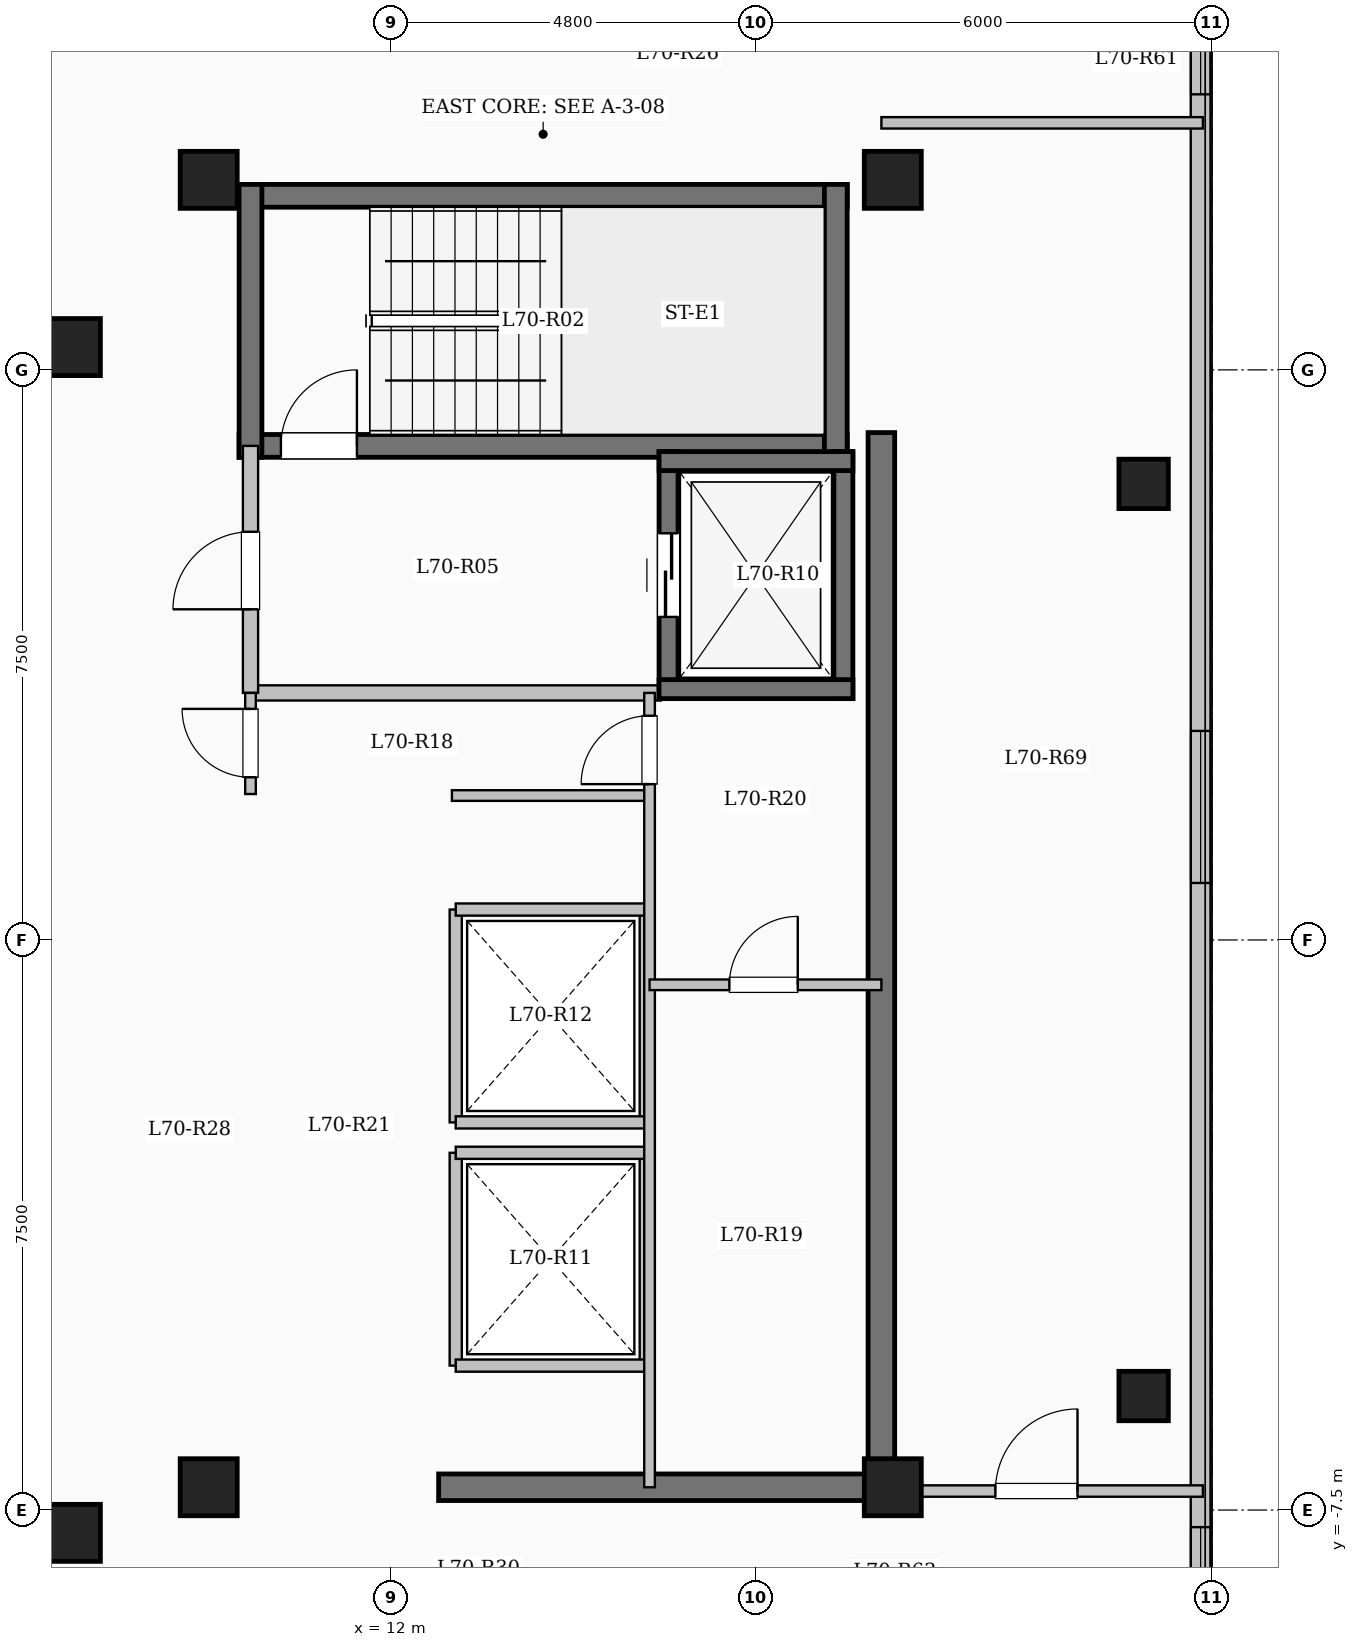
"""IFC4 building model, lengths in metres.
Left out: names, types, materials, properties, quantities, classifications, styles, units other than length and angle.
Written with IfcOpenShell. Run it as: python <this file> out.ifc"""

import sys

from ifc_helpers import new_model, si_unit, direction, frame, frame_2d, origin, origin_2d, place, context, subcontext, project, spatial, rectangle, extrude, element, fill, save


model = new_model("IFC4")
c1 = context("Model", 3, precision=1e-05, world=origin(), true_north=direction((0.0, 1.0)))
c2 = subcontext(c1, "Body", "Model", "MODEL_VIEW")
j1 = project(units=[si_unit("LENGTHUNIT", "METRE"), si_unit("PLANEANGLEUNIT", "RADIAN")], contexts=[c1])
p1 = place(None, origin())
s1 = spatial("IfcSite", under=j1, at=p1, CompositionType="ELEMENT")
p2 = place(p1, origin())
s2 = spatial("IfcBuilding", under=s1, at=p2, CompositionType="ELEMENT")
p3 = place(p2, frame((0.0, 0.0, 258.25)))
s3 = spatial("IfcBuildingStorey", under=s2, at=p3, CompositionType="ELEMENT", Elevation=258.25)
for number, where, z_axis, x_axis in (
    (1, (7.8, -7.8, 0.0), (0.0, 0.0, 1.0), (1.0, 0.0, 0.0)),
    (2, (7.8, 7.8, 0.0), (0.0, 0.0, 1.0), (1.0, 0.0, 0.0)),
    (3, (9.6, -7.2, 0.0), (0.0, 0.0, 1.0), (1.0, 0.0, 0.0)),
    (4, (9.6, 10.0, 0.0), (0.0, 0.0, 1.0), (1.0, 0.0, 0.0)),
    (5, (18.6, -7.2, 0.0), (0.0, 0.0, 1.0), (1.0, 0.0, 0.0)),
    (6, (18.6, 10.0, 0.0), (0.0, 0.0, 1.0), (1.0, 0.0, 0.0)),
):
    element("IfcColumn", number, at=place(p3, frame(where, z_axis=z_axis, x_axis=x_axis)), inside=s3, PredefinedType="COLUMN", context=c2, shape_type="SweptSolid", body=[
        extrude(rectangle(XDim=0.75, YDim=0.75, at=origin_2d()), origin(), (0.0, 0.0, 1.0), 3.35),
    ])
for number, where, z_axis, x_axis in (
    (7, (21.9, -6.0, 0.0), (0.0, 0.0, 1.0), (1.0, 0.0, 0.0)),
    (8, (21.9, 6.0, 0.0), (0.0, 0.0, 1.0), (1.0, 0.0, 0.0)),
):
    element("IfcColumn", number, at=place(p3, frame(where, z_axis=z_axis, x_axis=x_axis)), inside=s3, PredefinedType="COLUMN", context=c2, shape_type="SweptSolid", body=[
        extrude(rectangle(XDim=0.65, YDim=0.65, at=origin_2d()), origin(), (0.0, 0.0, 1.0), 3.35),
    ])
p4 = place(p3, frame((22.65, 17.55, 0.0), z_axis=(0.0, 0.0, 1.0), x_axis=(0.0, -1.0, 0.0)))
e9 = element("IfcWall", 9, at=p4, inside=s3, PredefinedType="SOLIDWALL", context=c2, shape_type="SweptSolid", body=[
    extrude(rectangle(XDim=35.1, YDim=0.26, at=frame_2d((17.55, 0.0))), origin(), (0.0, 0.0, 1.0), 3.1),
])
p5 = place(p4, frame((1.525, 0.0, 0.9)))
e10 = element("IfcOpeningElement", 10, at=p5, cuts=e9, PredefinedType="OPENING", context=c2, shape_type="SweptSolid", body=[
    extrude(rectangle(XDim=2.0, YDim=1.7, at=frame_2d((1.0, 0.85))), frame((0.0, 0.14, 0.0), z_axis=(0.0, -1.0, 0.0), x_axis=(1.0, 0.0, 0.0)), (0.0, 0.0, 1.0), 0.28),
])
p6 = place(p4, frame((5.425, 0.0, 0.95)))
e11 = element("IfcOpeningElement", 11, at=p6, cuts=e9, PredefinedType="OPENING", context=c2, shape_type="SweptSolid", body=[
    extrude(rectangle(XDim=1.0, YDim=1.5, at=frame_2d((0.5, 0.75))), frame((0.0, 0.14, 0.0), z_axis=(0.0, -1.0, 0.0), x_axis=(1.0, 0.0, 0.0)), (0.0, 0.0, 1.0), 0.28),
])
p7 = place(p4, frame((14.8, 0.0, 0.9)))
e12 = element("IfcOpeningElement", 12, at=p7, cuts=e9, PredefinedType="OPENING", context=c2, shape_type="SweptSolid", body=[
    extrude(rectangle(XDim=2.0, YDim=1.7, at=frame_2d((1.0, 0.85))), frame((0.0, 0.14, 0.0), z_axis=(0.0, -1.0, 0.0), x_axis=(1.0, 0.0, 0.0)), (0.0, 0.0, 1.0), 0.28),
])
p8 = place(p4, frame((25.275, 0.0, 0.95)))
e13 = element("IfcOpeningElement", 13, at=p8, cuts=e9, PredefinedType="OPENING", context=c2, shape_type="SweptSolid", body=[
    extrude(rectangle(XDim=1.2, YDim=1.5, at=frame_2d((0.6, 0.75))), frame((0.0, 0.14, 0.0), z_axis=(0.0, -1.0, 0.0), x_axis=(1.0, 0.0, 0.0)), (0.0, 0.0, 1.0), 0.28),
])
p9 = place(p4, frame((29.925, 0.0, 0.9)))
e14 = element("IfcOpeningElement", 14, at=p9, cuts=e9, PredefinedType="OPENING", context=c2, shape_type="SweptSolid", body=[
    extrude(rectangle(XDim=2.2, YDim=1.75, at=frame_2d((1.1, 0.875))), frame((0.0, 0.14, 0.0), z_axis=(0.0, -1.0, 0.0), x_axis=(1.0, 0.0, 0.0)), (0.0, 0.0, 1.0), 0.28),
])
p10 = place(p3, frame((10.0, 9.79, 0.0), z_axis=(0.0, 0.0, 1.0), x_axis=(1.0, 0.0, 0.0)))
e15 = element("IfcWall", 15, at=p10, inside=s3, PredefinedType="SHEAR", context=c2, shape_type="SweptSolid", body=[
    extrude(rectangle(XDim=8.0, YDim=0.3, at=frame_2d((4.0, 0.0))), origin(), (0.0, 0.0, 1.0), 3.35),
])
p11 = place(p3, frame((10.0, 6.5, 0.0), z_axis=(0.0, 0.0, 1.0), x_axis=(1.0, 0.0, 0.0)))
e16 = element("IfcWall", 16, at=p11, inside=s3, PredefinedType="SHEAR", context=c2, shape_type="SweptSolid", body=[
    extrude(rectangle(XDim=8.0, YDim=0.3, at=frame_2d((4.0, 0.0))), origin(), (0.0, 0.0, 1.0), 3.35),
])
p12 = place(p11, frame((0.55, 0.0, 0.0)))
e17 = element("IfcOpeningElement", 17, at=p12, cuts=e16, PredefinedType="OPENING", context=c2, shape_type="SweptSolid", body=[
    extrude(rectangle(XDim=1.0, YDim=2.15, at=frame_2d((0.5, 1.075))), frame((0.0, 0.16, 0.0), z_axis=(0.0, -1.0, 0.0), x_axis=(1.0, 0.0, 0.0)), (0.0, 0.0, 1.0), 0.32),
])
for number, where, z_axis, x_axis in (
    (18, (10.15, 6.35, 0.0), (0.0, 0.0, 1.0), (0.0, 1.0, 0.0)),
    (19, (17.85, 6.35, 0.0), (0.0, 0.0, 1.0), (0.0, 1.0, 0.0)),
):
    element("IfcWall", number, at=place(p3, frame(where, z_axis=z_axis, x_axis=x_axis)), inside=s3, PredefinedType="SHEAR", context=c2, shape_type="SweptSolid", body=[
        extrude(rectangle(XDim=3.59, YDim=0.3, at=frame_2d((1.795, 0.0))), origin(), (0.0, 0.0, 1.0), 3.35),
    ])
p13 = place(p3, frame((10.15, 3.25, 0.0), z_axis=(0.0, 0.0, 1.0), x_axis=(1.0, 0.0, 0.0)))
e20 = element("IfcWall", 20, at=p13, inside=s3, PredefinedType="SOLIDWALL", context=c2, shape_type="SweptSolid", body=[
    extrude(rectangle(XDim=5.4, YDim=0.2, at=frame_2d((2.7, 0.0))), origin(), (0.0, 0.0, 1.0), 3.1),
])
p14 = place(p3, frame((10.15, 3.25, 0.0), z_axis=(0.0, 0.0, 1.0), x_axis=(0.0, 1.0, 0.0)))
e21 = element("IfcWall", 21, at=p14, inside=s3, PredefinedType="SOLIDWALL", context=c2, shape_type="SweptSolid", body=[
    extrude(rectangle(XDim=3.25, YDim=0.2, at=frame_2d((1.625, 0.0))), origin(), (0.0, 0.0, 1.0), 3.1),
])
p15 = place(p14, frame((1.1, 0.0, 0.0)))
e22 = element("IfcOpeningElement", 22, at=p15, cuts=e21, PredefinedType="OPENING", context=c2, shape_type="SweptSolid", body=[
    extrude(rectangle(XDim=1.02, YDim=2.15, at=frame_2d((0.51, 1.075))), frame((0.0, 0.11, 0.0), z_axis=(0.0, -1.0, 0.0), x_axis=(1.0, 0.0, 0.0)), (0.0, 0.0, 1.0), 0.22),
])
p16 = place(p3, frame((15.65, 3.175, 0.0), z_axis=(0.0, 0.0, 1.0), x_axis=(0.0, 1.0, 0.0)))
e23 = element("IfcWall", 23, at=p16, inside=s3, PredefinedType="SHEAR", context=c2, shape_type="SweptSolid", body=[
    extrude(rectangle(XDim=3.25, YDim=0.25, at=frame_2d((1.625, 0.0))), origin(), (0.0, 0.0, 1.0), 3.35),
])
p17 = place(p16, frame((1.075, 0.0, 0.0)))
e24 = element("IfcOpeningElement", 24, at=p17, cuts=e23, PredefinedType="OPENING", context=c2, shape_type="SweptSolid", body=[
    extrude(rectangle(XDim=1.1, YDim=2.15, at=frame_2d((0.55, 1.075))), frame((0.0, 0.135, 0.0), z_axis=(0.0, -1.0, 0.0), x_axis=(1.0, 0.0, 0.0)), (0.0, 0.0, 1.0), 0.27),
])
p18 = place(p3, frame((17.95, 3.175, 0.0), z_axis=(0.0, 0.0, 1.0), x_axis=(0.0, 1.0, 0.0)))
e25 = element("IfcWall", 25, at=p18, inside=s3, PredefinedType="SHEAR", context=c2, shape_type="SweptSolid", body=[
    extrude(rectangle(XDim=3.25, YDim=0.25, at=frame_2d((1.625, 0.0))), origin(), (0.0, 0.0, 1.0), 3.35),
])
for number, where, z_axis, x_axis in (
    (26, (15.525, 3.3, 0.0), (0.0, 0.0, 1.0), (1.0, 0.0, 0.0)),
    (27, (15.525, 6.3, 0.0), (0.0, 0.0, 1.0), (1.0, 0.0, 0.0)),
):
    element("IfcWall", number, at=place(p3, frame(where, z_axis=z_axis, x_axis=x_axis)), inside=s3, PredefinedType="SHEAR", context=c2, shape_type="SweptSolid", body=[
        extrude(rectangle(XDim=2.55, YDim=0.25, at=frame_2d((1.275, 0.0))), origin(), (0.0, 0.0, 1.0), 3.35),
    ])
for number, where, z_axis, x_axis in (
    (28, (12.85, -5.6, 0.0), (0.0, 0.0, 1.0), (0.0, 1.0, 0.0)),
    (29, (15.35, -5.6, 0.0), (0.0, 0.0, 1.0), (0.0, 1.0, 0.0)),
):
    element("IfcWall", number, at=place(p3, frame(where, z_axis=z_axis, x_axis=x_axis)), inside=s3, PredefinedType="SOLIDWALL", context=c2, shape_type="SweptSolid", body=[
        extrude(rectangle(XDim=2.8, YDim=0.16, at=frame_2d((1.4, 0.0))), origin(), (0.0, 0.0, 1.0), 3.1),
    ])
for number, where, z_axis, x_axis in (
    (30, (12.85, -5.6, 0.0), (0.0, 0.0, 1.0), (1.0, 0.0, 0.0)),
    (31, (12.85, -2.8, 0.0), (0.0, 0.0, 1.0), (1.0, 0.0, 0.0)),
):
    element("IfcWall", number, at=place(p3, frame(where, z_axis=z_axis, x_axis=x_axis)), inside=s3, PredefinedType="SOLIDWALL", context=c2, shape_type="SweptSolid", body=[
        extrude(rectangle(XDim=2.5, YDim=0.16, at=frame_2d((1.25, 0.0))), origin(), (0.0, 0.0, 1.0), 3.1),
    ])
for number, where, z_axis, x_axis in (
    (32, (12.85, -2.4, 0.0), (0.0, 0.0, 1.0), (0.0, 1.0, 0.0)),
    (33, (15.35, -2.4, 0.0), (0.0, 0.0, 1.0), (0.0, 1.0, 0.0)),
):
    element("IfcWall", number, at=place(p3, frame(where, z_axis=z_axis, x_axis=x_axis)), inside=s3, PredefinedType="SOLIDWALL", context=c2, shape_type="SweptSolid", body=[
        extrude(rectangle(XDim=2.8, YDim=0.16, at=frame_2d((1.4, 0.0))), origin(), (0.0, 0.0, 1.0), 3.1),
    ])
for number, where, z_axis, x_axis in (
    (34, (12.85, -2.4, 0.0), (0.0, 0.0, 1.0), (1.0, 0.0, 0.0)),
    (35, (12.85, 0.4, 0.0), (0.0, 0.0, 1.0), (1.0, 0.0, 0.0)),
):
    element("IfcWall", number, at=place(p3, frame(where, z_axis=z_axis, x_axis=x_axis)), inside=s3, PredefinedType="SOLIDWALL", context=c2, shape_type="SweptSolid", body=[
        extrude(rectangle(XDim=2.5, YDim=0.16, at=frame_2d((1.25, 0.0))), origin(), (0.0, 0.0, 1.0), 3.1),
    ])
p19 = place(p3, frame((18.45, -7.375, 0.0), z_axis=(0.0, 0.0, 1.0), x_axis=(0.0, 1.0, 0.0)))
e36 = element("IfcWall", 36, at=p19, inside=s3, PredefinedType="SHEAR", context=c2, shape_type="SweptSolid", body=[
    extrude(rectangle(XDim=14.05, YDim=0.35, at=frame_2d((7.025, 0.0))), origin(), (0.0, 0.0, 1.0), 3.35),
])
p20 = place(p3, frame((12.625, -7.2, 0.0), z_axis=(0.0, 0.0, 1.0), x_axis=(1.0, 0.0, 0.0)))
e37 = element("IfcWall", 37, at=p20, inside=s3, PredefinedType="SHEAR", context=c2, shape_type="SweptSolid", body=[
    extrude(rectangle(XDim=6.0, YDim=0.35, at=frame_2d((3.0, 0.0))), origin(), (0.0, 0.0, 1.0), 3.35),
])
p21 = place(p3, frame((12.8, 1.9, 0.0), z_axis=(0.0, 0.0, 1.0), x_axis=(1.0, 0.0, 0.0)))
e38 = element("IfcWall", 38, at=p21, inside=s3, PredefinedType="PARTITIONING", context=c2, shape_type="SweptSolid", body=[
    extrude(rectangle(XDim=2.6, YDim=0.14, at=frame_2d((1.3, 0.0))), origin(), (0.0, 0.0, 1.0), 3.1),
])
p22 = place(p3, frame((10.15, 1.92, 0.0), z_axis=(0.0, 0.0, 1.0), x_axis=(0.0, 1.0, 0.0)))
e39 = element("IfcWall", 39, at=p22, inside=s3, PredefinedType="PARTITIONING", context=c2, shape_type="SweptSolid", body=[
    extrude(rectangle(XDim=1.33, YDim=0.14, at=frame_2d((0.665, 0.0))), origin(), (0.0, 0.0, 1.0), 3.1),
])
p23 = place(p22, frame((0.22, 0.0, 0.0)))
e40 = element("IfcOpeningElement", 40, at=p23, cuts=e39, PredefinedType="OPENING", context=c2, shape_type="SweptSolid", body=[
    extrude(rectangle(XDim=0.9, YDim=2.08, at=frame_2d((0.45, 1.04))), frame((0.0, 0.08, 0.0), z_axis=(0.0, -1.0, 0.0), x_axis=(1.0, 0.0, 0.0)), (0.0, 0.0, 1.0), 0.16),
])
p24 = place(p3, frame((15.4, -7.2, 0.0), z_axis=(0.0, 0.0, 1.0), x_axis=(0.0, 1.0, 0.0)))
e41 = element("IfcWall", 41, at=p24, inside=s3, PredefinedType="PARTITIONING", context=c2, shape_type="SweptSolid", body=[
    extrude(rectangle(XDim=10.45, YDim=0.14, at=frame_2d((5.225, 0.0))), origin(), (0.0, 0.0, 1.0), 3.1),
])
p25 = place(p24, frame((9.25, 0.0, 0.0)))
e42 = element("IfcOpeningElement", 42, at=p25, cuts=e41, PredefinedType="OPENING", context=c2, shape_type="SweptSolid", body=[
    extrude(rectangle(XDim=0.9, YDim=2.08, at=frame_2d((0.45, 1.04))), frame((0.0, 0.08, 0.0), z_axis=(0.0, -1.0, 0.0), x_axis=(1.0, 0.0, 0.0)), (0.0, 0.0, 1.0), 0.16),
])
p26 = place(p3, frame((15.4, -0.59, 0.0), z_axis=(0.0, 0.0, 1.0), x_axis=(1.0, 0.0, 0.0)))
e43 = element("IfcWall", 43, at=p26, inside=s3, PredefinedType="PARTITIONING", context=c2, shape_type="SweptSolid", body=[
    extrude(rectangle(XDim=3.05, YDim=0.14, at=frame_2d((1.525, 0.0))), origin(), (0.0, 0.0, 1.0), 3.1),
])
p27 = place(p26, frame((1.05, 0.0, 0.0)))
e44 = element("IfcOpeningElement", 44, at=p27, cuts=e43, PredefinedType="OPENING", context=c2, shape_type="SweptSolid", body=[
    extrude(rectangle(XDim=0.9, YDim=2.08, at=frame_2d((0.45, 1.04))), frame((0.0, 0.08, 0.0), z_axis=(0.0, -1.0, 0.0), x_axis=(1.0, 0.0, 0.0)), (0.0, 0.0, 1.0), 0.16),
])
p28 = place(p3, frame((18.45, -7.25, 0.0), z_axis=(0.0, 0.0, 1.0), x_axis=(1.0, 0.0, 0.0)))
e45 = element("IfcWall", 45, at=p28, inside=s3, PredefinedType="PARTITIONING", context=c2, shape_type="SweptSolid", body=[
    extrude(rectangle(XDim=4.23, YDim=0.15, at=frame_2d((2.115, 0.0))), origin(), (0.0, 0.0, 1.0), 3.1),
])
p29 = place(p28, frame((1.5, 0.0, 0.0)))
e46 = element("IfcOpeningElement", 46, at=p29, cuts=e45, PredefinedType="OPENING", context=c2, shape_type="SweptSolid", body=[
    extrude(rectangle(XDim=1.08, YDim=2.15, at=frame_2d((0.54, 1.075))), frame((0.0, 0.085, 0.0), z_axis=(0.0, -1.0, 0.0), x_axis=(1.0, 0.0, 0.0)), (0.0, 0.0, 1.0), 0.17),
])
p30 = place(p3, frame((18.45, 10.75, 0.0), z_axis=(0.0, 0.0, 1.0), x_axis=(1.0, 0.0, 0.0)))
e47 = element("IfcWall", 47, at=p30, inside=s3, PredefinedType="PARTITIONING", context=c2, shape_type="SweptSolid", body=[
    extrude(rectangle(XDim=4.23, YDim=0.15, at=frame_2d((2.115, 0.0))), origin(), (0.0, 0.0, 1.0), 3.1),
])
p31 = place(p6, origin())
e48 = element("IfcWindow", 48, at=p31, inside=s3, PartitioningType="SINGLE_PANEL", PredefinedType="WINDOW", context=c2, shape_type="SweptSolid", body=[
    extrude(rectangle(XDim=1.0, YDim=1.5, at=frame_2d((0.5, 0.75))), frame((0.0, 0.03, 0.0), z_axis=(0.0, -1.0, 0.0), x_axis=(1.0, 0.0, 0.0)), (0.0, 0.0, 1.0), 0.06),
])
fill(e11, e48)
p32 = place(p7, origin())
e49 = element("IfcWindow", 49, at=p32, inside=s3, PartitioningType="SINGLE_PANEL", PredefinedType="WINDOW", context=c2, shape_type="SweptSolid", body=[
    extrude(rectangle(XDim=2.0, YDim=1.7, at=frame_2d((1.0, 0.85))), frame((0.0, 0.03, 0.0), z_axis=(0.0, -1.0, 0.0), x_axis=(1.0, 0.0, 0.0)), (0.0, 0.0, 1.0), 0.06),
])
fill(e12, e49)
p33 = place(p8, origin())
e50 = element("IfcWindow", 50, at=p33, inside=s3, PartitioningType="SINGLE_PANEL", PredefinedType="WINDOW", context=c2, shape_type="SweptSolid", body=[
    extrude(rectangle(XDim=1.2, YDim=1.5, at=frame_2d((0.6, 0.75))), frame((0.0, 0.03, 0.0), z_axis=(0.0, -1.0, 0.0), x_axis=(1.0, 0.0, 0.0)), (0.0, 0.0, 1.0), 0.06),
])
fill(e13, e50)
p34 = place(p12, origin())
e51 = element("IfcDoor", 51, at=p34, inside=s3, OperationType="SINGLE_SWING_RIGHT", PredefinedType="DOOR", context=c2, shape_type="SweptSolid", body=[
    extrude(rectangle(XDim=1.0, YDim=2.15, at=frame_2d((0.5, 1.075))), frame((0.0, 0.025, 0.0), z_axis=(0.0, -1.0, 0.0), x_axis=(1.0, 0.0, 0.0)), (0.0, 0.0, 1.0), 0.05),
])
fill(e17, e51)
p35 = place(p15, origin())
e52 = element("IfcDoor", 52, at=p35, inside=s3, OperationType="SINGLE_SWING_LEFT", PredefinedType="DOOR", context=c2, shape_type="SweptSolid", body=[
    extrude(rectangle(XDim=1.02, YDim=2.15, at=frame_2d((0.51, 1.075))), frame((0.0, 0.025, 0.0), z_axis=(0.0, -1.0, 0.0), x_axis=(1.0, 0.0, 0.0)), (0.0, 0.0, 1.0), 0.05),
])
fill(e22, e52)
p36 = place(p17, origin())
e53 = element("IfcDoor", 53, at=p36, inside=s3, OperationType="SLIDING_TO_LEFT", PredefinedType="DOOR", context=c2, shape_type="SweptSolid", body=[
    extrude(rectangle(XDim=1.1, YDim=2.15, at=frame_2d((0.55, 1.075))), frame((0.0, 0.025, 0.0), z_axis=(0.0, -1.0, 0.0), x_axis=(1.0, 0.0, 0.0)), (0.0, 0.0, 1.0), 0.05),
])
fill(e24, e53)
p37 = place(p23, origin())
e54 = element("IfcDoor", 54, at=p37, inside=s3, OperationType="SINGLE_SWING_RIGHT", PredefinedType="DOOR", context=c2, shape_type="SweptSolid", body=[
    extrude(rectangle(XDim=0.9, YDim=2.08, at=frame_2d((0.45, 1.04))), frame((0.0, 0.025, 0.0), z_axis=(0.0, -1.0, 0.0), x_axis=(1.0, 0.0, 0.0)), (0.0, 0.0, 1.0), 0.05),
])
fill(e40, e54)
p38 = place(p25, origin())
e55 = element("IfcDoor", 55, at=p38, inside=s3, OperationType="SINGLE_SWING_LEFT", PredefinedType="DOOR", context=c2, shape_type="SweptSolid", body=[
    extrude(rectangle(XDim=0.9, YDim=2.08, at=frame_2d((0.45, 1.04))), frame((0.0, 0.025, 0.0), z_axis=(0.0, -1.0, 0.0), x_axis=(1.0, 0.0, 0.0)), (0.0, 0.0, 1.0), 0.05),
])
fill(e42, e55)
p39 = place(p27, origin())
e56 = element("IfcDoor", 56, at=p39, inside=s3, OperationType="SINGLE_SWING_RIGHT", PredefinedType="DOOR", context=c2, shape_type="SweptSolid", body=[
    extrude(rectangle(XDim=0.9, YDim=2.08, at=frame_2d((0.45, 1.04))), frame((0.0, 0.025, 0.0), z_axis=(0.0, -1.0, 0.0), x_axis=(1.0, 0.0, 0.0)), (0.0, 0.0, 1.0), 0.05),
])
fill(e44, e56)
p40 = place(p29, origin())
e57 = element("IfcDoor", 57, at=p40, inside=s3, OperationType="SINGLE_SWING_RIGHT", PredefinedType="DOOR", context=c2, shape_type="SweptSolid", body=[
    extrude(rectangle(XDim=1.08, YDim=2.15, at=frame_2d((0.54, 1.075))), frame((0.0, 0.025, 0.0), z_axis=(0.0, -1.0, 0.0), x_axis=(1.0, 0.0, 0.0)), (0.0, 0.0, 1.0), 0.05),
])
fill(e46, e57)
save(model, sys.argv[1])
